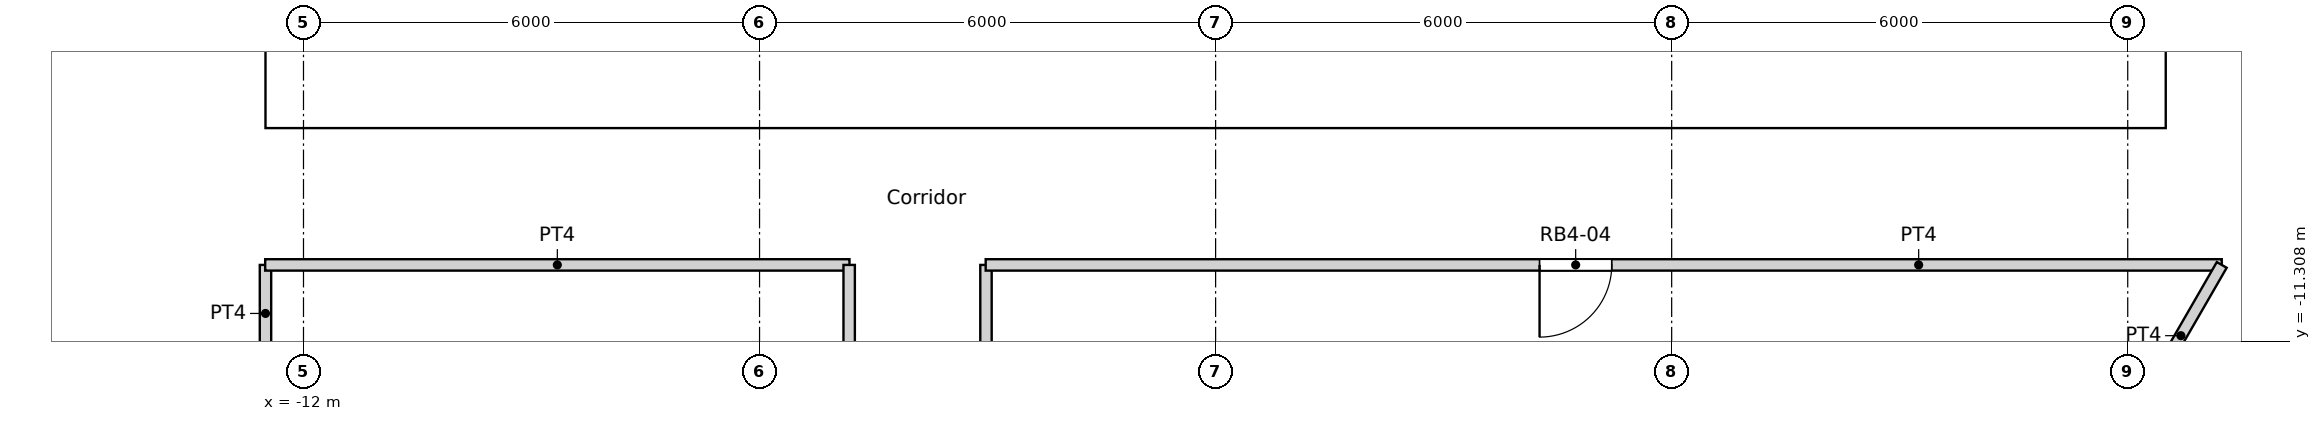
"""IFC4 building model, lengths in metres.
Left out: names, types, materials, properties, quantities, classifications, styles, units other than length and angle.
Written with IfcOpenShell. Run it as: python <this file> out.ifc"""

import sys

from ifc_helpers import new_model, si_unit, direction, frame, frame_2d, origin, place, context, subcontext, project, spatial, rectangle, extrude, element, fill, save


model = new_model("IFC4")
c1 = context("Model", 3, precision=1e-05, world=origin(), true_north=direction((0.0, 1.0)))
c2 = subcontext(c1, "Body", "Model", "MODEL_VIEW")
j1 = project(units=[si_unit("LENGTHUNIT", "METRE"), si_unit("PLANEANGLEUNIT", "RADIAN")], contexts=[c1])
p1 = place(None, origin())
s1 = spatial("IfcSite", under=j1, at=p1, CompositionType="ELEMENT")
p2 = place(p1, origin())
s2 = spatial("IfcBuilding", under=s1, at=p2, CompositionType="ELEMENT")
p3 = place(p2, frame((0.0, 0.0, 158.4)))
s3 = spatial("IfcBuildingStorey", under=s2, at=p3, CompositionType="ELEMENT", Elevation=158.4)
p4 = place(p3, frame((-12.5, -8.05, 0.0), z_axis=(0.0, 0.0, 1.0), x_axis=(1.0, 0.0, 0.0)))
e1 = element("IfcWall", 1, at=p4, inside=s3, PredefinedType="SOLIDWALL", context=c2, shape_type="SweptSolid", body=[
    extrude(rectangle(XDim=25.0, YDim=0.9, at=frame_2d((12.5, 0.0))), origin(), (0.0, 0.0, 1.0), 3.6),
])
p5 = place(p4, frame((13.4, 0.0, 0.0)))
e2 = element("IfcOpeningElement", 2, at=p5, cuts=e1, PredefinedType="OPENING", context=c2, shape_type="SweptSolid", body=[
    extrude(rectangle(XDim=1.0, YDim=2.1, at=frame_2d((0.5, 1.05))), frame((0.0, 0.45, 0.0), z_axis=(0.0, -1.0, 0.0), x_axis=(1.0, 0.0, 0.0)), (0.0, 0.0, 1.0), 0.9),
])
p6 = place(p4, frame((8.3, 0.0, 0.0)))
e3 = element("IfcOpeningElement", 3, at=p6, cuts=e1, PredefinedType="OPENING", context=c2, shape_type="SweptSolid", body=[
    extrude(rectangle(XDim=1.8, YDim=2.1, at=frame_2d((0.9, 1.05))), frame((0.0, 0.45, 0.0), z_axis=(0.0, -1.0, 0.0), x_axis=(1.0, 0.0, 0.0)), (0.0, 0.0, 1.0), 0.9),
])
p7 = place(p4, frame((14.9, 0.0, 0.0)))
e4 = element("IfcOpeningElement", 4, at=p7, cuts=e1, PredefinedType="OPENING", context=c2, shape_type="SweptSolid", body=[
    extrude(rectangle(XDim=1.8, YDim=2.1, at=frame_2d((0.9, 1.05))), frame((0.0, 0.45, 0.0), z_axis=(0.0, -1.0, 0.0), x_axis=(1.0, 0.0, 0.0)), (0.0, 0.0, 1.0), 0.9),
])
p8 = place(p3, frame((-12.05, -7.6, 0.0), z_axis=(0.0, 0.0, 1.0), x_axis=(0.0, 1.0, 0.0)))
e5 = element("IfcWall", 5, at=p8, inside=s3, PredefinedType="SOLIDWALL", context=c2, shape_type="SweptSolid", body=[
    extrude(rectangle(XDim=15.2, YDim=0.9, at=frame_2d((7.6, 0.0))), origin(), (0.0, 0.0, 1.0), 3.6),
])
p9 = place(p8, frame((7.1, 0.0, 0.0)))
e6 = element("IfcOpeningElement", 6, at=p9, cuts=e5, PredefinedType="OPENING", context=c2, shape_type="SweptSolid", body=[
    extrude(rectangle(XDim=1.0, YDim=2.1, at=frame_2d((0.5, 1.05))), frame((0.0, 0.45, 0.0), z_axis=(0.0, -1.0, 0.0), x_axis=(1.0, 0.0, 0.0)), (0.0, 0.0, 1.0), 0.9),
])
p10 = place(p3, frame((12.05, -7.6, 0.0), z_axis=(0.0, 0.0, 1.0), x_axis=(0.0, 1.0, 0.0)))
e7 = element("IfcWall", 7, at=p10, inside=s3, PredefinedType="SOLIDWALL", context=c2, shape_type="SweptSolid", body=[
    extrude(rectangle(XDim=15.2, YDim=0.9, at=frame_2d((7.6, 0.0))), origin(), (0.0, 0.0, 1.0), 3.6),
])
p11 = place(p10, frame((5.1, 0.0, 0.0)))
e8 = element("IfcOpeningElement", 8, at=p11, cuts=e7, PredefinedType="OPENING", context=c2, shape_type="SweptSolid", body=[
    extrude(rectangle(XDim=1.0, YDim=2.1, at=frame_2d((0.5, 1.05))), frame((0.0, 0.45, 0.0), z_axis=(0.0, -1.0, 0.0), x_axis=(1.0, 0.0, 0.0)), (0.0, 0.0, 1.0), 0.9),
])
for number, where, z_axis, x_axis in (
    (9, (0.55, -7.6, 0.0), (0.0, 0.0, 1.0), (0.0, 1.0, 0.0)),
    (10, (2.25, -7.6, 0.0), (0.0, 0.0, 1.0), (0.0, 1.0, 0.0)),
):
    element("IfcWall", number, at=place(p3, frame(where, z_axis=z_axis, x_axis=x_axis)), inside=s3, PredefinedType="SOLIDWALL", context=c2, shape_type="SweptSolid", body=[
        extrude(rectangle(XDim=4.35, YDim=0.3, at=frame_2d((2.175, 0.0))), origin(), (0.0, 0.0, 1.0), 3.3),
    ])
p12 = place(p3, frame((-9.05, -7.15, 0.0), z_axis=(0.0, 0.0, 1.0), x_axis=(1.0, 0.0, 0.0)))
e11 = element("IfcWall", 11, at=p12, inside=s3, PredefinedType="SOLIDWALL", context=c2, shape_type="SweptSolid", body=[
    extrude(rectangle(XDim=4.85, YDim=0.9, at=frame_2d((2.425, 0.0))), origin(), (0.0, 0.0, 1.0), 3.3),
])
p13 = place(p3, frame((-2.4, -7.15, 0.0), z_axis=(0.0, 0.0, 1.0), x_axis=(1.0, 0.0, 0.0)))
e12 = element("IfcWall", 12, at=p13, inside=s3, PredefinedType="SOLIDWALL", context=c2, shape_type="SweptSolid", body=[
    extrude(rectangle(XDim=2.8, YDim=0.9, at=frame_2d((1.4, 0.0))), origin(), (0.0, 0.0, 1.0), 3.3),
])
p14 = place(p3, frame((4.2, -7.15, 0.0), z_axis=(0.0, 0.0, 1.0), x_axis=(1.0, 0.0, 0.0)))
e13 = element("IfcWall", 13, at=p14, inside=s3, PredefinedType="SOLIDWALL", context=c2, shape_type="SweptSolid", body=[
    extrude(rectangle(XDim=4.85, YDim=0.9, at=frame_2d((2.425, 0.0))), origin(), (0.0, 0.0, 1.0), 3.3),
])
p15 = place(p3, frame((-12.504, -10.3, 0.0), z_axis=(0.0, 0.0, 1.0), x_axis=(1.0, 0.0, 0.0)))
e14 = element("IfcWall", 14, at=p15, inside=s3, PredefinedType="PARTITIONING", context=c2, shape_type="SweptSolid", body=[
    extrude(rectangle(XDim=7.687, YDim=0.15, at=frame_2d((3.844, 0.0))), origin(), (0.0, 0.0, 1.0), 3.3),
])
p16 = place(p3, frame((-3.025, -10.3, 0.0), z_axis=(0.0, 0.0, 1.0), x_axis=(1.0, 0.0, 0.0)))
e15 = element("IfcWall", 15, at=p16, inside=s3, PredefinedType="PARTITIONING", context=c2, shape_type="SweptSolid", body=[
    extrude(rectangle(XDim=16.262, YDim=0.15, at=frame_2d((8.131, 0.0))), origin(), (0.0, 0.0, 1.0), 3.3),
])
p17 = place(p16, frame((7.287, 0.0, 0.0)))
e16 = element("IfcOpeningElement", 16, at=p17, cuts=e15, PredefinedType="OPENING", context=c2, shape_type="SweptSolid", body=[
    extrude(rectangle(XDim=0.95, YDim=2.1, at=frame_2d((0.475, 1.05))), frame((0.0, 0.075, 0.0), z_axis=(0.0, -1.0, 0.0), x_axis=(1.0, 0.0, 0.0)), (0.0, 0.0, 1.0), 0.15),
])
p18 = place(p3, frame((12.162, -12.162, 0.0), z_axis=(0.0, 0.0, 1.0), x_axis=(0.499961633463, 0.866047553582, 0.0)))
e17 = element("IfcWall", 17, at=p18, inside=s3, PredefinedType="PARTITIONING", context=c2, shape_type="SweptSolid", body=[
    extrude(rectangle(XDim=2.15, YDim=0.15, at=frame_2d((1.075, 0.0))), origin(), (0.0, 0.0, 1.0), 3.3),
])
p19 = place(p3, frame((-12.5, -11.577, 0.0), z_axis=(0.0, 0.0, 1.0), x_axis=(0.0, 1.0, 0.0)))
e18 = element("IfcWall", 18, at=p19, inside=s3, PredefinedType="PARTITIONING", context=c2, shape_type="SweptSolid", body=[
    extrude(rectangle(XDim=1.277, YDim=0.15, at=frame_2d((0.638, 0.0))), origin(), (0.0, 0.0, 1.0), 3.3),
])
p20 = place(p3, frame((-18.688, -6.802, 0.0), z_axis=(0.0, 0.0, 1.0), x_axis=(0.499914202267, -0.866074933462, 0.0)))
e19 = element("IfcWall", 19, at=p20, inside=s3, PredefinedType="PARTITIONING", context=c2, shape_type="SweptSolid", body=[
    extrude(rectangle(XDim=6.907, YDim=0.15, at=frame_2d((3.454, 0.0))), origin(), (0.0, 0.0, 1.0), 3.3),
])
p21 = place(p20, frame((3.003, 0.0, 0.0)))
e20 = element("IfcOpeningElement", 20, at=p21, cuts=e19, PredefinedType="OPENING", context=c2, shape_type="SweptSolid", body=[
    extrude(rectangle(XDim=1.0, YDim=2.04, at=frame_2d((0.5, 1.02))), frame((0.0, 0.075, 0.0), z_axis=(0.0, -1.0, 0.0), x_axis=(1.0, 0.0, 0.0)), (0.0, 0.0, 1.0), 0.15),
])
p22 = place(p3, frame((-4.821, -16.401, 0.0), z_axis=(0.0, 0.0, 1.0), x_axis=(0.0, 1.0, 0.0)))
e21 = element("IfcWall", 21, at=p22, inside=s3, PredefinedType="PARTITIONING", context=c2, shape_type="SweptSolid", body=[
    extrude(rectangle(XDim=6.101, YDim=0.15, at=frame_2d((3.05, 0.0))), origin(), (0.0, 0.0, 1.0), 3.3),
])
p23 = place(p3, frame((-3.021, -16.614, 0.0), z_axis=(0.0, 0.0, 1.0), x_axis=(0.0, 1.0, 0.0)))
e22 = element("IfcWall", 22, at=p23, inside=s3, PredefinedType="PARTITIONING", context=c2, shape_type="SweptSolid", body=[
    extrude(rectangle(XDim=6.314, YDim=0.15, at=frame_2d((3.157, 0.0))), origin(), (0.0, 0.0, 1.0), 3.3),
])
p24 = place(p5, origin())
e23 = element("IfcDoor", 23, at=p24, inside=s3, OperationType="SINGLE_SWING_LEFT", PredefinedType="DOOR", context=c2, shape_type="SweptSolid", body=[
    extrude(rectangle(XDim=1.0, YDim=2.1, at=frame_2d((0.5, 1.05))), frame((0.0, 0.025, 0.0), z_axis=(0.0, -1.0, 0.0), x_axis=(1.0, 0.0, 0.0)), (0.0, 0.0, 1.0), 0.05),
])
fill(e2, e23)
p25 = place(p6, origin())
e24 = element("IfcDoor", 24, at=p25, inside=s3, OperationType="DOUBLE_DOOR_SINGLE_SWING", PredefinedType="DOOR", context=c2, shape_type="SweptSolid", body=[
    extrude(rectangle(XDim=1.8, YDim=2.1, at=frame_2d((0.9, 1.05))), frame((0.0, 0.025, 0.0), z_axis=(0.0, -1.0, 0.0), x_axis=(1.0, 0.0, 0.0)), (0.0, 0.0, 1.0), 0.05),
])
fill(e3, e24)
p26 = place(p7, origin())
e25 = element("IfcDoor", 25, at=p26, inside=s3, OperationType="DOUBLE_DOOR_SINGLE_SWING", PredefinedType="DOOR", context=c2, shape_type="SweptSolid", body=[
    extrude(rectangle(XDim=1.8, YDim=2.1, at=frame_2d((0.9, 1.05))), frame((0.0, 0.025, 0.0), z_axis=(0.0, -1.0, 0.0), x_axis=(1.0, 0.0, 0.0)), (0.0, 0.0, 1.0), 0.05),
])
fill(e4, e25)
p27 = place(p17, origin())
e26 = element("IfcDoor", 26, at=p27, inside=s3, OperationType="SINGLE_SWING_RIGHT", PredefinedType="DOOR", context=c2, shape_type="SweptSolid", body=[
    extrude(rectangle(XDim=0.95, YDim=2.1, at=frame_2d((0.475, 1.05))), frame((0.0, 0.025, 0.0), z_axis=(0.0, -1.0, 0.0), x_axis=(1.0, 0.0, 0.0)), (0.0, 0.0, 1.0), 0.05),
])
fill(e16, e26)
save(model, sys.argv[1])
